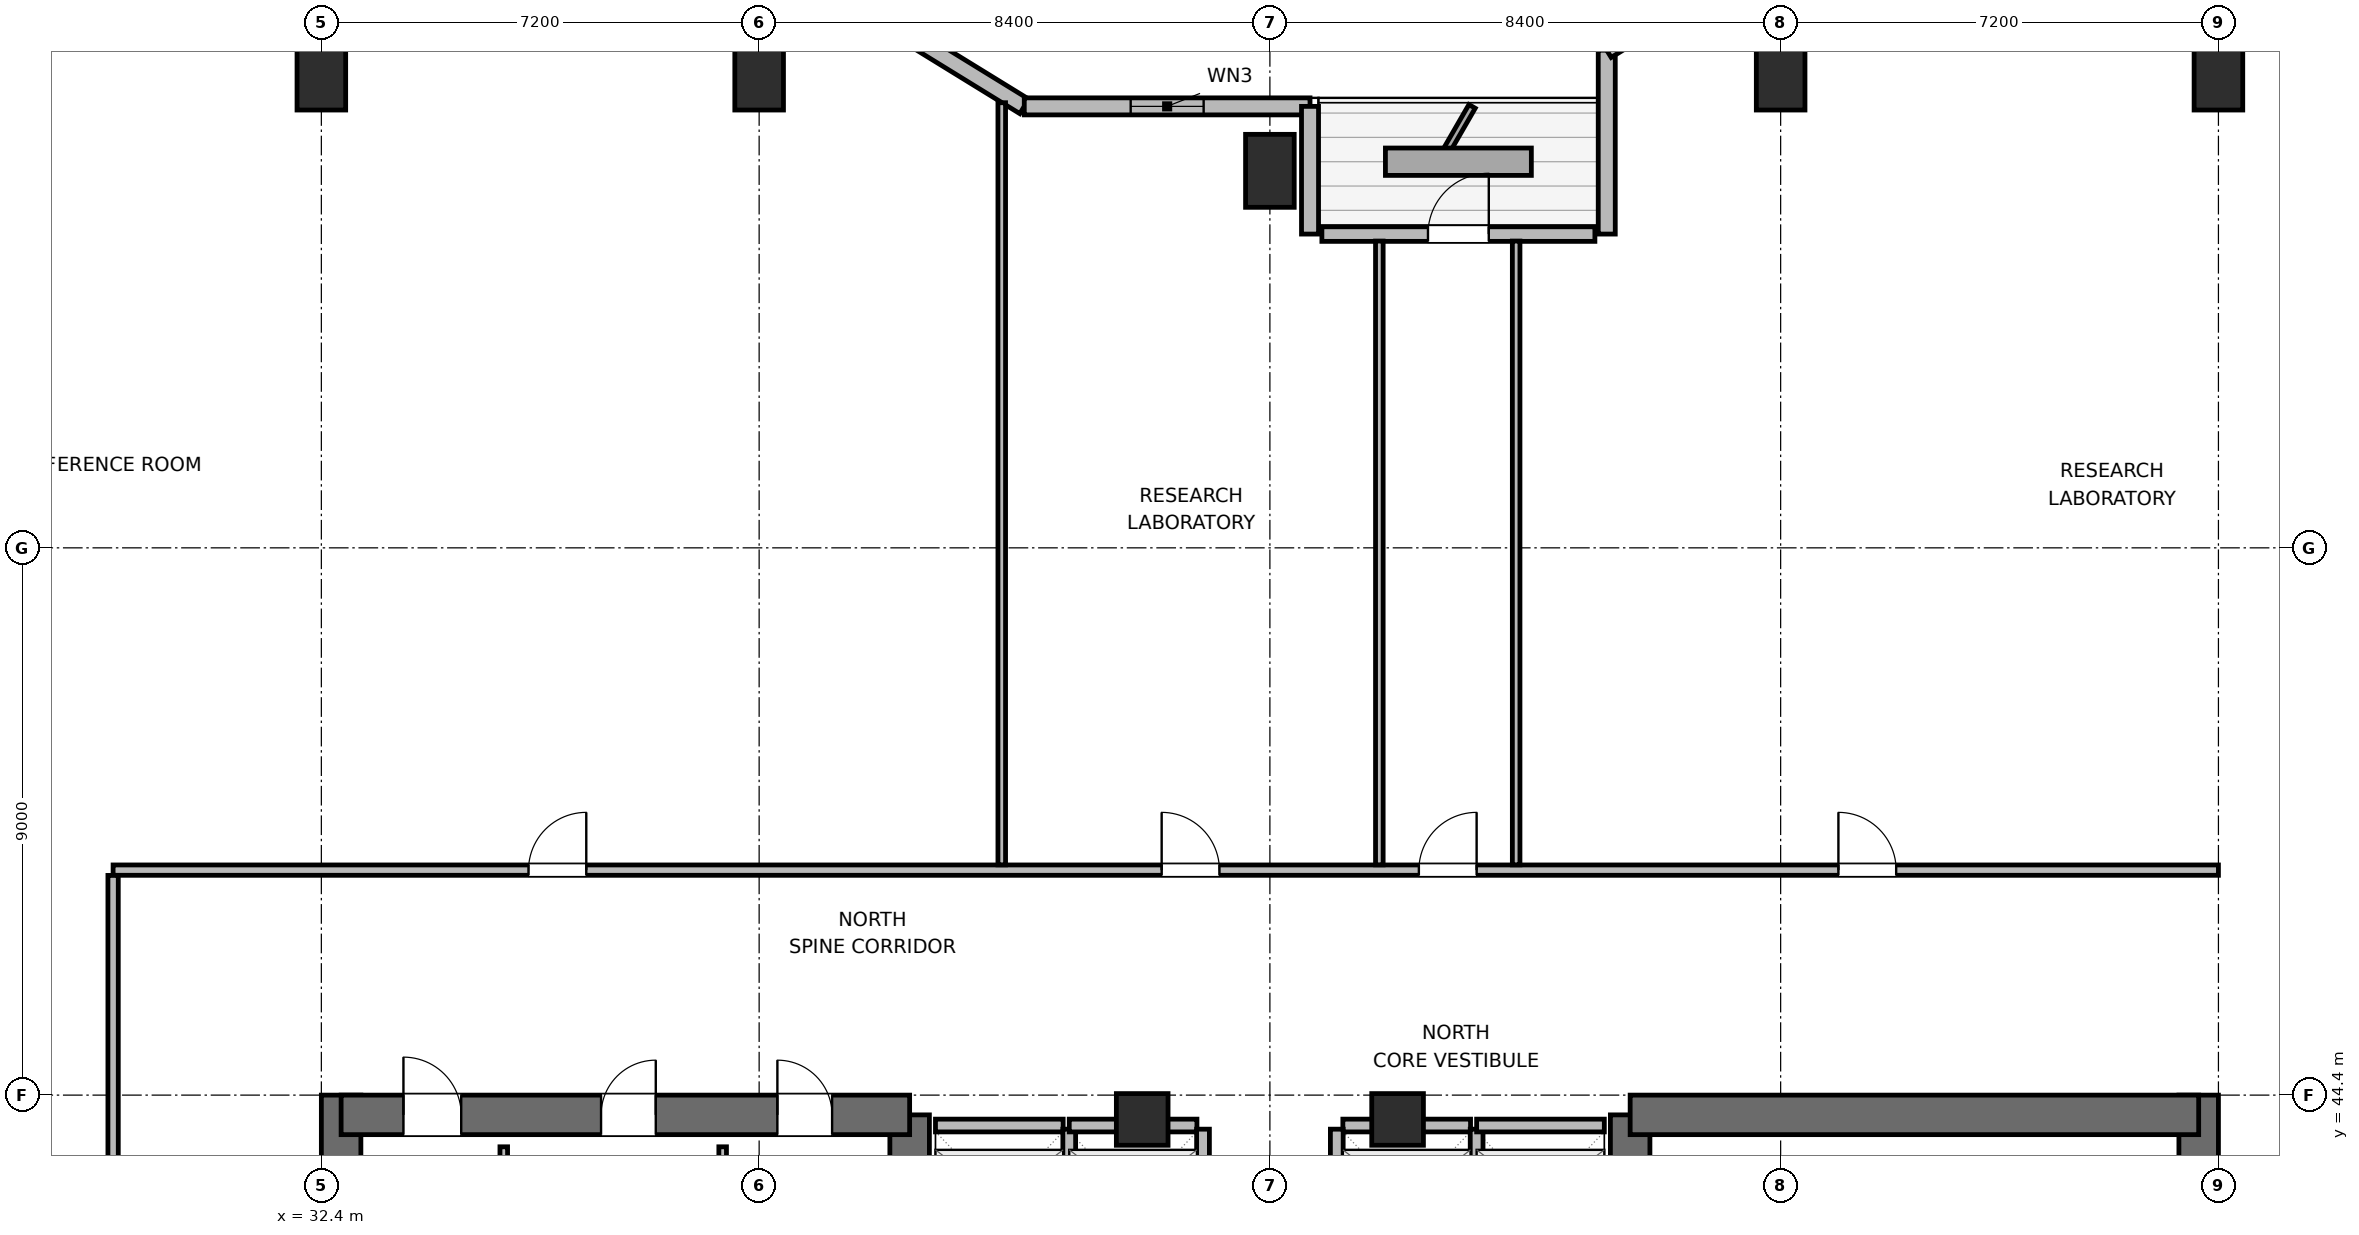
"""IFC4 building model, lengths in metres.
Left out: names, types, materials, properties, quantities, classifications, styles, units other than length and angle.
Written with IfcOpenShell. Run it as: python <this file> out.ifc"""

import sys

from ifc_helpers import new_model, si_unit, direction, frame, frame_2d, origin, origin_2d, place, context, subcontext, project, spatial, rectangle, extrude, element, fill, save


model = new_model("IFC4")
c1 = context("Model", 3, precision=1e-05, world=origin(), true_north=direction((0.0, 1.0)))
c2 = subcontext(c1, "Body", "Model", "MODEL_VIEW")
j1 = project(units=[si_unit("LENGTHUNIT", "METRE"), si_unit("PLANEANGLEUNIT", "RADIAN")], contexts=[c1])
p1 = place(None, origin())
s1 = spatial("IfcSite", under=j1, at=p1, CompositionType="ELEMENT")
p2 = place(p1, origin())
s2 = spatial("IfcBuilding", under=s1, at=p2, CompositionType="ELEMENT")
p3 = place(p2, frame((0.0, 0.0, 201.9)))
s3 = spatial("IfcBuildingStorey", under=s2, at=p3, CompositionType="ELEMENT", Elevation=201.9)
p4 = place(p3, frame((32.725, 27.6, 0.0), z_axis=(0.0, 0.0, 1.0), x_axis=(0.0, 1.0, 0.0)))
e1 = element("IfcWall", 1, at=p4, inside=s3, PredefinedType="SHEAR", context=c2, shape_type="SweptSolid", body=[
    extrude(rectangle(XDim=16.8, YDim=0.65, at=frame_2d((8.4, 0.0))), origin(), (0.0, 0.0, 1.0), 3.9),
])
p5 = place(p3, frame((42.075, 37.8, 0.0), z_axis=(0.0, 0.0, 1.0), x_axis=(0.0, 1.0, 0.0)))
e2 = element("IfcWall", 2, at=p5, inside=s3, PredefinedType="SHEAR", context=c2, shape_type="SweptSolid", body=[
    extrude(rectangle(XDim=6.275, YDim=0.65, at=frame_2d((3.137, 0.0))), origin(), (0.0, 0.0, 1.0), 3.9),
])
p6 = place(p3, frame((32.725, 44.075, 0.0), z_axis=(0.0, 0.0, 1.0), x_axis=(1.0, 0.0, 0.0)))
e3 = element("IfcWall", 3, at=p6, inside=s3, PredefinedType="SHEAR", context=c2, shape_type="SweptSolid", body=[
    extrude(rectangle(XDim=9.35, YDim=0.65, at=frame_2d((4.675, 0.0))), origin(), (0.0, 0.0, 1.0), 3.9),
])
p7 = place(p6, frame((1.025, 0.0, 0.0)))
e4 = element("IfcOpeningElement", 4, at=p7, cuts=e3, PredefinedType="OPENING", context=c2, shape_type="SweptSolid", body=[
    extrude(rectangle(XDim=0.95, YDim=2.04, at=frame_2d((0.475, 1.02))), frame((0.0, 0.335, 0.0), z_axis=(0.0, -1.0, 0.0), x_axis=(1.0, 0.0, 0.0)), (0.0, 0.0, 1.0), 0.67),
])
p8 = place(p6, frame((4.275, 0.0, 0.0)))
e5 = element("IfcOpeningElement", 5, at=p8, cuts=e3, PredefinedType="OPENING", context=c2, shape_type="SweptSolid", body=[
    extrude(rectangle(XDim=0.9, YDim=2.02, at=frame_2d((0.45, 1.01))), frame((0.0, 0.335, 0.0), z_axis=(0.0, -1.0, 0.0), x_axis=(1.0, 0.0, 0.0)), (0.0, 0.0, 1.0), 0.67),
])
p9 = place(p6, frame((7.175, 0.0, 0.0)))
e6 = element("IfcOpeningElement", 6, at=p9, cuts=e3, PredefinedType="OPENING", context=c2, shape_type="SweptSolid", body=[
    extrude(rectangle(XDim=0.9, YDim=2.02, at=frame_2d((0.45, 1.01))), frame((0.0, 0.335, 0.0), z_axis=(0.0, -1.0, 0.0), x_axis=(1.0, 0.0, 0.0)), (0.0, 0.0, 1.0), 0.67),
])
p10 = place(p3, frame((53.925, 38.0, 0.0), z_axis=(0.0, 0.0, 1.0), x_axis=(0.0, 1.0, 0.0)))
e7 = element("IfcWall", 7, at=p10, inside=s3, PredefinedType="SHEAR", context=c2, shape_type="SweptSolid", body=[
    extrude(rectangle(XDim=6.075, YDim=0.65, at=frame_2d((3.038, 0.0))), origin(), (0.0, 0.0, 1.0), 3.9),
])
p11 = place(p3, frame((63.275, 27.6, 0.0), z_axis=(0.0, 0.0, 1.0), x_axis=(0.0, 1.0, 0.0)))
e8 = element("IfcWall", 8, at=p11, inside=s3, PredefinedType="SHEAR", context=c2, shape_type="SweptSolid", body=[
    extrude(rectangle(XDim=16.8, YDim=0.65, at=frame_2d((8.4, 0.0))), origin(), (0.0, 0.0, 1.0), 3.9),
])
p12 = place(p3, frame((53.925, 44.075, 0.0), z_axis=(0.0, 0.0, 1.0), x_axis=(1.0, 0.0, 0.0)))
e9 = element("IfcWall", 9, at=p12, inside=s3, PredefinedType="SHEAR", context=c2, shape_type="SweptSolid", body=[
    extrude(rectangle(XDim=9.35, YDim=0.65, at=frame_2d((4.675, 0.0))), origin(), (0.0, 0.0, 1.0), 3.9),
])
for number, where, z_axis, x_axis in (
    (10, (32.4, 61.2, 0.0), (0.0, 0.0, 1.0), (1.0, 0.0, 0.0)),
    (11, (39.6, 61.2, 0.0), (0.0, 0.0, 1.0), (1.0, 0.0, 0.0)),
    (12, (48.0, 59.6, 0.0), (0.0, 0.0, 1.0), (1.0, 0.0, 0.0)),
    (13, (56.4, 61.2, 0.0), (0.0, 0.0, 1.0), (1.0, 0.0, 0.0)),
    (14, (63.6, 61.2, 0.0), (0.0, 0.0, 1.0), (1.0, 0.0, 0.0)),
):
    element("IfcColumn", number, at=place(p3, frame(where, z_axis=z_axis, x_axis=x_axis)), inside=s3, PredefinedType="COLUMN", context=c2, shape_type="SweptSolid", body=[
        extrude(rectangle(XDim=0.8, YDim=1.2, at=origin_2d()), origin(), (0.0, 0.0, 1.0), 3.9),
    ])
for number, where, z_axis, x_axis in (
    (15, (45.9, 44.0, 0.0), (0.0, 0.0, 1.0), (1.0, 0.0, 0.0)),
    (16, (50.1, 44.0, 0.0), (0.0, 0.0, 1.0), (1.0, 0.0, 0.0)),
):
    element("IfcColumn", number, at=place(p3, frame(where, z_axis=z_axis, x_axis=x_axis)), inside=s3, PredefinedType="COLUMN", context=c2, shape_type="SweptSolid", body=[
        extrude(rectangle(XDim=0.85, YDim=0.85, at=origin_2d()), origin(), (0.0, 0.0, 1.0), 3.9),
    ])
p13 = place(p3, frame((41.36, 62.26, 0.0), z_axis=(0.0, 0.0, 1.0), x_axis=(0.851652825334, -0.524106349037, 0.0)))
e17 = element("IfcWall", 17, at=p13, inside=s3, PredefinedType="SOLIDWALL", context=c2, shape_type="SweptSolid", body=[
    extrude(rectangle(XDim=3.053, YDim=0.28, at=frame_2d((1.526, 0.0))), origin(), (0.0, 0.0, 1.0), 2.265),
])
p14 = place(p3, frame((43.96, 60.66, 0.0), z_axis=(0.0, 0.0, 1.0), x_axis=(1.0, 0.0, 0.0)))
e18 = element("IfcWall", 18, at=p14, inside=s3, PredefinedType="SOLIDWALL", context=c2, shape_type="SweptSolid", body=[
    extrude(rectangle(XDim=4.699, YDim=0.28, at=frame_2d((2.35, 0.0))), origin(), (0.0, 0.0, 1.0), 2.265),
])
p15 = place(p14, frame((1.75, 0.0, 0.85)))
e19 = element("IfcOpeningElement", 19, at=p15, cuts=e18, PredefinedType="OPENING", context=c2, shape_type="SweptSolid", body=[
    extrude(rectangle(XDim=1.2, YDim=1.1, at=frame_2d((0.6, 0.55))), frame((0.0, 0.15, 0.0), z_axis=(0.0, -1.0, 0.0), x_axis=(1.0, 0.0, 0.0)), (0.0, 0.0, 1.0), 0.3),
])
p16 = place(p3, frame((48.66, 60.66, 0.0), z_axis=(0.0, 0.0, 1.0), x_axis=(0.0, -1.0, 0.0)))
e20 = element("IfcWall", 20, at=p16, inside=s3, PredefinedType="SOLIDWALL", context=c2, shape_type="SweptSolid", body=[
    extrude(rectangle(XDim=2.1, YDim=0.28, at=frame_2d((1.05, 0.0))), origin(), (0.0, 0.0, 1.0), 2.265),
])
p17 = place(p3, frame((48.855, 58.56, 0.0), z_axis=(0.0, 0.0, 1.0), x_axis=(1.0, 0.0, 0.0)))
e21 = element("IfcWall", 21, at=p17, inside=s3, PredefinedType="SOLIDWALL", context=c2, shape_type="SweptSolid", body=[
    extrude(rectangle(XDim=4.49, YDim=0.24, at=frame_2d((2.245, 0.0))), origin(), (0.0, 0.0, 1.0), 3.68),
])
p18 = place(p17, frame((1.745, 0.0, 0.0)))
e22 = element("IfcOpeningElement", 22, at=p18, cuts=e21, PredefinedType="OPENING", context=c2, shape_type="SweptSolid", body=[
    extrude(rectangle(XDim=1.0, YDim=2.02, at=frame_2d((0.5, 1.01))), frame((0.0, 0.13, 0.0), z_axis=(0.0, -1.0, 0.0), x_axis=(1.0, 0.0, 0.0)), (0.0, 0.0, 1.0), 0.26),
])
p19 = place(p3, frame((53.54, 58.56, 0.0), z_axis=(0.0, 0.0, 1.0), x_axis=(0.0, 1.0, 0.0)))
e23 = element("IfcWall", 23, at=p19, inside=s3, PredefinedType="SOLIDWALL", context=c2, shape_type="SweptSolid", body=[
    extrude(rectangle(XDim=3.024, YDim=0.28, at=frame_2d((1.512, 0.0))), origin(), (0.0, 0.0, 1.0), 2.265),
])
p20 = place(p3, frame((53.54, 61.584, 0.0), z_axis=(0.0, 0.0, 1.0), x_axis=(0.851801140441, 0.523865266212, 0.0)))
e24 = element("IfcWall", 24, at=p20, inside=s3, PredefinedType="SOLIDWALL", context=c2, shape_type="SweptSolid", body=[
    extrude(rectangle(XDim=1.291, YDim=0.28, at=frame_2d((0.646, 0.0))), origin(), (0.0, 0.0, 1.0), 3.68),
])
for number, where, z_axis, x_axis in (
    (25, (35.4, 41.095, 0.0), (0.0, 0.0, 1.0), (0.0, 1.0, 0.0)),
    (26, (39.0, 41.095, 0.0), (0.0, 0.0, 1.0), (0.0, 1.0, 0.0)),
):
    element("IfcWall", number, at=place(p3, frame(where, z_axis=z_axis, x_axis=x_axis)), inside=s3, PredefinedType="PARTITIONING", context=c2, shape_type="SweptSolid", body=[
        extrude(rectangle(XDim=2.455, YDim=0.125, at=frame_2d((1.228, 0.0))), origin(), (0.0, 0.0, 1.0), 3.68),
    ])
p21 = place(p3, frame((42.5, 43.9, 0.0), z_axis=(0.0, 0.0, 1.0), x_axis=(1.0, 0.0, 0.0)))
e27 = element("IfcWall", 27, at=p21, inside=s3, PredefinedType="PARTITIONING", context=c2, shape_type="SweptSolid", body=[
    extrude(rectangle(XDim=2.1, YDim=0.21, at=frame_2d((1.05, 0.0))), origin(), (0.0, 0.0, 1.0), 2.765),
])
p22 = place(p3, frame((44.7, 41.56, 0.0), z_axis=(0.0, 0.0, 1.0), x_axis=(0.0, 1.0, 0.0)))
e28 = element("IfcWall", 28, at=p22, inside=s3, PredefinedType="PARTITIONING", context=c2, shape_type="SweptSolid", body=[
    extrude(rectangle(XDim=2.28, YDim=0.21, at=frame_2d((1.14, 0.0))), origin(), (0.0, 0.0, 1.0), 3.68),
])
p23 = place(p3, frame((44.7, 43.9, 0.0), z_axis=(0.0, 0.0, 1.0), x_axis=(1.0, 0.0, 0.0)))
e29 = element("IfcWall", 29, at=p23, inside=s3, PredefinedType="PARTITIONING", context=c2, shape_type="SweptSolid", body=[
    extrude(rectangle(XDim=2.1, YDim=0.21, at=frame_2d((1.05, 0.0))), origin(), (0.0, 0.0, 1.0), 2.765),
])
p24 = place(p3, frame((46.9, 41.56, 0.0), z_axis=(0.0, 0.0, 1.0), x_axis=(0.0, 1.0, 0.0)))
e30 = element("IfcWall", 30, at=p24, inside=s3, PredefinedType="PARTITIONING", context=c2, shape_type="SweptSolid", body=[
    extrude(rectangle(XDim=2.28, YDim=0.21, at=frame_2d((1.14, 0.0))), origin(), (0.0, 0.0, 1.0), 3.68),
])
p25 = place(p3, frame((49.2, 43.9, 0.0), z_axis=(0.0, 0.0, 1.0), x_axis=(1.0, 0.0, 0.0)))
e31 = element("IfcWall", 31, at=p25, inside=s3, PredefinedType="PARTITIONING", context=c2, shape_type="SweptSolid", body=[
    extrude(rectangle(XDim=2.1, YDim=0.21, at=frame_2d((1.05, 0.0))), origin(), (0.0, 0.0, 1.0), 2.765),
])
for number, where, z_axis, x_axis in (
    (32, (49.1, 41.56, 0.0), (0.0, 0.0, 1.0), (0.0, 1.0, 0.0)),
    (33, (51.4, 41.56, 0.0), (0.0, 0.0, 1.0), (0.0, 1.0, 0.0)),
):
    element("IfcWall", number, at=place(p3, frame(where, z_axis=z_axis, x_axis=x_axis)), inside=s3, PredefinedType="PARTITIONING", context=c2, shape_type="SweptSolid", body=[
        extrude(rectangle(XDim=2.28, YDim=0.21, at=frame_2d((1.14, 0.0))), origin(), (0.0, 0.0, 1.0), 3.68),
    ])
p26 = place(p3, frame((51.4, 43.9, 0.0), z_axis=(0.0, 0.0, 1.0), x_axis=(1.0, 0.0, 0.0)))
e34 = element("IfcWall", 34, at=p26, inside=s3, PredefinedType="PARTITIONING", context=c2, shape_type="SweptSolid", body=[
    extrude(rectangle(XDim=2.1, YDim=0.21, at=frame_2d((1.05, 0.0))), origin(), (0.0, 0.0, 1.0), 2.765),
])
p27 = place(p3, frame((28.975, 48.1, 0.0), z_axis=(0.0, 0.0, 1.0), x_axis=(1.0, 0.0, 0.0)))
e35 = element("IfcWall", 35, at=p27, inside=s3, PredefinedType="PARTITIONING", context=c2, shape_type="SweptSolid", body=[
    extrude(rectangle(XDim=34.625, YDim=0.17, at=frame_2d((17.312, 0.0))), origin(), (0.0, 0.0, 1.0), 3.68),
])
p28 = place(p27, frame((6.832, 0.0, 0.0)))
e36 = element("IfcOpeningElement", 36, at=p28, cuts=e35, PredefinedType="OPENING", context=c2, shape_type="SweptSolid", body=[
    extrude(rectangle(XDim=0.95, YDim=2.04, at=frame_2d((0.475, 1.02))), frame((0.0, 0.095, 0.0), z_axis=(0.0, -1.0, 0.0), x_axis=(1.0, 0.0, 0.0)), (0.0, 0.0, 1.0), 0.19),
])
p29 = place(p27, frame((17.245, 0.0, 0.0)))
e37 = element("IfcOpeningElement", 37, at=p29, cuts=e35, PredefinedType="OPENING", context=c2, shape_type="SweptSolid", body=[
    extrude(rectangle(XDim=0.95, YDim=2.04, at=frame_2d((0.475, 1.02))), frame((0.0, 0.095, 0.0), z_axis=(0.0, -1.0, 0.0), x_axis=(1.0, 0.0, 0.0)), (0.0, 0.0, 1.0), 0.19),
])
p30 = place(p27, frame((21.475, 0.0, 0.0)))
e38 = element("IfcOpeningElement", 38, at=p30, cuts=e35, PredefinedType="OPENING", context=c2, shape_type="SweptSolid", body=[
    extrude(rectangle(XDim=0.95, YDim=2.04, at=frame_2d((0.475, 1.02))), frame((0.0, 0.095, 0.0), z_axis=(0.0, -1.0, 0.0), x_axis=(1.0, 0.0, 0.0)), (0.0, 0.0, 1.0), 0.19),
])
p31 = place(p27, frame((28.375, 0.0, 0.0)))
e39 = element("IfcOpeningElement", 39, at=p31, cuts=e35, PredefinedType="OPENING", context=c2, shape_type="SweptSolid", body=[
    extrude(rectangle(XDim=0.95, YDim=2.04, at=frame_2d((0.475, 1.02))), frame((0.0, 0.095, 0.0), z_axis=(0.0, -1.0, 0.0), x_axis=(1.0, 0.0, 0.0)), (0.0, 0.0, 1.0), 0.19),
])
p32 = place(p3, frame((28.975, 37.1, 0.0), z_axis=(0.0, 0.0, 1.0), x_axis=(0.0, 1.0, 0.0)))
e40 = element("IfcWall", 40, at=p32, inside=s3, PredefinedType="PARTITIONING", context=c2, shape_type="SweptSolid", body=[
    extrude(rectangle(XDim=10.913, YDim=0.17, at=frame_2d((5.457, 0.0))), origin(), (0.0, 0.0, 1.0), 3.68),
])
p33 = place(p32, frame((5.025, 0.0, 0.0)))
e41 = element("IfcOpeningElement", 41, at=p33, cuts=e40, PredefinedType="OPENING", context=c2, shape_type="SweptSolid", body=[
    extrude(rectangle(XDim=0.95, YDim=2.04, at=frame_2d((0.475, 1.02))), frame((0.0, 0.095, 0.0), z_axis=(0.0, -1.0, 0.0), x_axis=(1.0, 0.0, 0.0)), (0.0, 0.0, 1.0), 0.19),
])
p34 = place(p3, frame((43.59, 48.187, 0.0), z_axis=(0.0, 0.0, 1.0), x_axis=(0.0, 1.0, 0.0)))
e42 = element("IfcWall", 42, at=p34, inside=s3, PredefinedType="PARTITIONING", context=c2, shape_type="SweptSolid", body=[
    extrude(rectangle(XDim=12.533, YDim=0.125, at=frame_2d((6.267, 0.0))), origin(), (0.0, 0.0, 1.0), 3.043),
])
p35 = place(p3, frame((49.8, 48.187, 0.0), z_axis=(0.0, 0.0, 1.0), x_axis=(0.0, 1.0, 0.0)))
e43 = element("IfcWall", 43, at=p35, inside=s3, PredefinedType="PARTITIONING", context=c2, shape_type="SweptSolid", body=[
    extrude(rectangle(XDim=10.258, YDim=0.125, at=frame_2d((5.129, 0.0))), origin(), (0.0, 0.0, 1.0), 3.68),
])
p36 = place(p3, frame((52.05, 48.187, 0.0), z_axis=(0.0, 0.0, 1.0), x_axis=(0.0, 1.0, 0.0)))
e44 = element("IfcWall", 44, at=p36, inside=s3, PredefinedType="PARTITIONING", context=c2, shape_type="SweptSolid", body=[
    extrude(rectangle(XDim=10.258, YDim=0.125, at=frame_2d((5.129, 0.0))), origin(), (0.0, 0.0, 1.0), 3.043),
])
p37 = place(p15, origin())
e45 = element("IfcWindow", 45, at=p37, inside=s3, PartitioningType="SINGLE_PANEL", PredefinedType="WINDOW", context=c2, shape_type="SweptSolid", body=[
    extrude(rectangle(XDim=1.2, YDim=1.1, at=frame_2d((0.6, 0.55))), frame((0.0, 0.03, 0.0), z_axis=(0.0, -1.0, 0.0), x_axis=(1.0, 0.0, 0.0)), (0.0, 0.0, 1.0), 0.06),
])
fill(e19, e45)
p38 = place(p18, origin())
e46 = element("IfcDoor", 46, at=p38, inside=s3, OperationType="SINGLE_SWING_RIGHT", PredefinedType="DOOR", context=c2, shape_type="SweptSolid", body=[
    extrude(rectangle(XDim=1.0, YDim=2.02, at=frame_2d((0.5, 1.01))), frame((0.0, 0.025, 0.0), z_axis=(0.0, -1.0, 0.0), x_axis=(1.0, 0.0, 0.0)), (0.0, 0.0, 1.0), 0.05),
])
fill(e22, e46)
p39 = place(p7, origin())
e47 = element("IfcDoor", 47, at=p39, inside=s3, OperationType="SINGLE_SWING_LEFT", PredefinedType="DOOR", context=c2, shape_type="SweptSolid", body=[
    extrude(rectangle(XDim=0.95, YDim=2.04, at=frame_2d((0.475, 1.02))), frame((0.0, 0.025, 0.0), z_axis=(0.0, -1.0, 0.0), x_axis=(1.0, 0.0, 0.0)), (0.0, 0.0, 1.0), 0.05),
])
fill(e4, e47)
p40 = place(p8, origin())
e48 = element("IfcDoor", 48, at=p40, inside=s3, OperationType="SINGLE_SWING_RIGHT", PredefinedType="DOOR", context=c2, shape_type="SweptSolid", body=[
    extrude(rectangle(XDim=0.9, YDim=2.02, at=frame_2d((0.45, 1.01))), frame((0.0, 0.025, 0.0), z_axis=(0.0, -1.0, 0.0), x_axis=(1.0, 0.0, 0.0)), (0.0, 0.0, 1.0), 0.05),
])
fill(e5, e48)
p41 = place(p9, origin())
e49 = element("IfcDoor", 49, at=p41, inside=s3, OperationType="SINGLE_SWING_LEFT", PredefinedType="DOOR", context=c2, shape_type="SweptSolid", body=[
    extrude(rectangle(XDim=0.9, YDim=2.02, at=frame_2d((0.45, 1.01))), frame((0.0, 0.025, 0.0), z_axis=(0.0, -1.0, 0.0), x_axis=(1.0, 0.0, 0.0)), (0.0, 0.0, 1.0), 0.05),
])
fill(e6, e49)
p42 = place(p28, origin())
e50 = element("IfcDoor", 50, at=p42, inside=s3, OperationType="SINGLE_SWING_RIGHT", PredefinedType="DOOR", context=c2, shape_type="SweptSolid", body=[
    extrude(rectangle(XDim=0.95, YDim=2.04, at=frame_2d((0.475, 1.02))), frame((0.0, 0.025, 0.0), z_axis=(0.0, -1.0, 0.0), x_axis=(1.0, 0.0, 0.0)), (0.0, 0.0, 1.0), 0.05),
])
fill(e36, e50)
p43 = place(p29, origin())
e51 = element("IfcDoor", 51, at=p43, inside=s3, OperationType="SINGLE_SWING_LEFT", PredefinedType="DOOR", context=c2, shape_type="SweptSolid", body=[
    extrude(rectangle(XDim=0.95, YDim=2.04, at=frame_2d((0.475, 1.02))), frame((0.0, 0.025, 0.0), z_axis=(0.0, -1.0, 0.0), x_axis=(1.0, 0.0, 0.0)), (0.0, 0.0, 1.0), 0.05),
])
fill(e37, e51)
p44 = place(p30, origin())
e52 = element("IfcDoor", 52, at=p44, inside=s3, OperationType="SINGLE_SWING_RIGHT", PredefinedType="DOOR", context=c2, shape_type="SweptSolid", body=[
    extrude(rectangle(XDim=0.95, YDim=2.04, at=frame_2d((0.475, 1.02))), frame((0.0, 0.025, 0.0), z_axis=(0.0, -1.0, 0.0), x_axis=(1.0, 0.0, 0.0)), (0.0, 0.0, 1.0), 0.05),
])
fill(e38, e52)
p45 = place(p31, origin())
e53 = element("IfcDoor", 53, at=p45, inside=s3, OperationType="SINGLE_SWING_LEFT", PredefinedType="DOOR", context=c2, shape_type="SweptSolid", body=[
    extrude(rectangle(XDim=0.95, YDim=2.04, at=frame_2d((0.475, 1.02))), frame((0.0, 0.025, 0.0), z_axis=(0.0, -1.0, 0.0), x_axis=(1.0, 0.0, 0.0)), (0.0, 0.0, 1.0), 0.05),
])
fill(e39, e53)
save(model, sys.argv[1])
